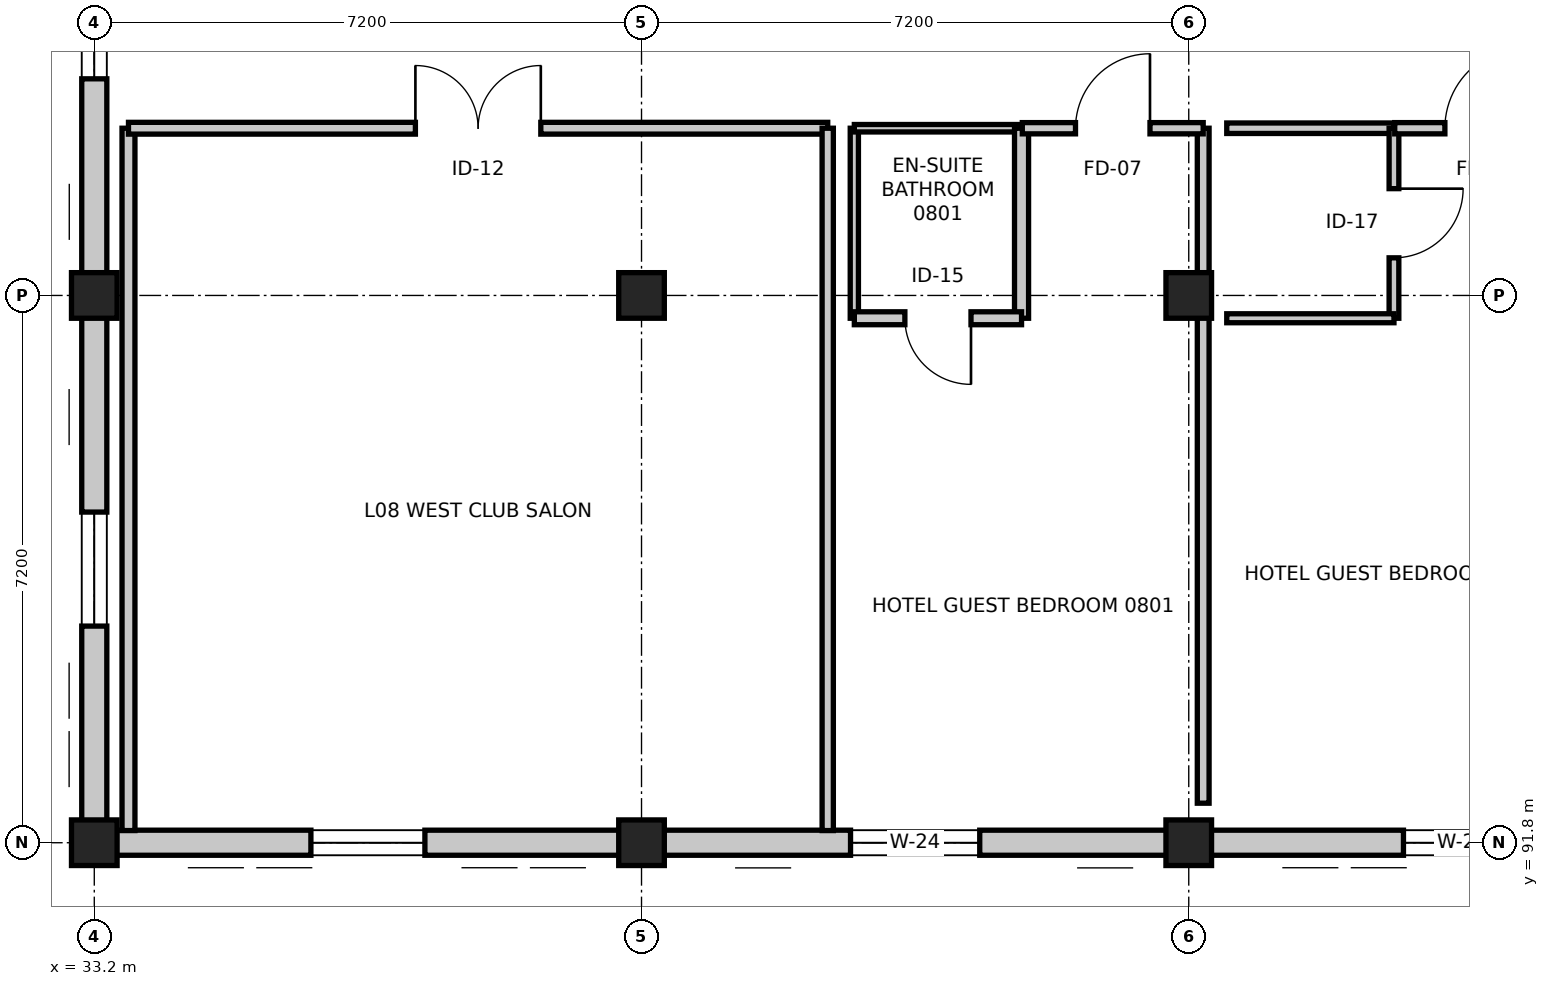
"""IFC4 building model, lengths in metres.
Left out: names, types, materials, properties, quantities, classifications, styles, units other than length and angle.
Written with IfcOpenShell. Run it as: python <this file> out.ifc"""

import sys

from ifc_helpers import new_model, si_unit, direction, frame, frame_2d, origin, origin_2d, place, context, subcontext, project, spatial, rectangle, extrude, element, fill, save


model = new_model("IFC4")
c1 = context("Model", 3, precision=1e-05, world=origin(), true_north=direction((0.0, 1.0)))
c2 = subcontext(c1, "Body", "Model", "MODEL_VIEW")
j1 = project(units=[si_unit("LENGTHUNIT", "METRE"), si_unit("PLANEANGLEUNIT", "RADIAN")], contexts=[c1])
p1 = place(None, origin())
s1 = spatial("IfcSite", under=j1, at=p1, CompositionType="ELEMENT")
p2 = place(p1, origin())
s2 = spatial("IfcBuilding", under=s1, at=p2, CompositionType="ELEMENT")
p3 = place(p2, frame((0.0, 0.0, 33.6)))
s3 = spatial("IfcBuildingStorey", under=s2, at=p3, CompositionType="ELEMENT", Elevation=33.6)
for number, where, z_axis, x_axis in (
    (1, (33.2, 91.8, 0.0), (0.0, 0.0, 1.0), (1.0, 0.0, 0.0)),
    (2, (33.2, 99.0, 0.0), (0.0, 0.0, 1.0), (1.0, 0.0, 0.0)),
    (3, (40.4, 91.8, 0.0), (0.0, 0.0, 1.0), (1.0, 0.0, 0.0)),
    (4, (40.4, 99.0, 0.0), (0.0, 0.0, 1.0), (1.0, 0.0, 0.0)),
    (5, (47.6, 91.8, 0.0), (0.0, 0.0, 1.0), (1.0, 0.0, 0.0)),
    (6, (47.6, 99.0, 0.0), (0.0, 0.0, 1.0), (1.0, 0.0, 0.0)),
):
    element("IfcColumn", number, at=place(p3, frame(where, z_axis=z_axis, x_axis=x_axis)), inside=s3, PredefinedType="COLUMN", context=c2, shape_type="SweptSolid", body=[
        extrude(rectangle(XDim=0.6, YDim=0.6, at=origin_2d()), origin(), (0.0, 0.0, 1.0), 3.6),
    ])
p4 = place(p3, frame((54.8, 91.8, 0.0), z_axis=(0.0, 0.0, 1.0), x_axis=(-1.0, 0.0, 0.0)))
e7 = element("IfcWall", 7, at=p4, inside=s3, PredefinedType="STANDARD", context=c2, shape_type="SweptSolid", body=[
    extrude(rectangle(XDim=7.2, YDim=0.33, at=frame_2d((3.6, 0.0))), origin(), (0.0, 0.0, 1.0), 2.745),
])
p5 = place(p4, frame((2.825, 0.0, 0.75)))
e8 = element("IfcOpeningElement", 8, at=p5, cuts=e7, PredefinedType="OPENING", context=c2, shape_type="SweptSolid", body=[
    extrude(rectangle(XDim=1.55, YDim=1.75, at=frame_2d((0.775, 0.875))), frame((0.0, 0.175, 0.0), z_axis=(0.0, -1.0, 0.0), x_axis=(1.0, 0.0, 0.0)), (0.0, 0.0, 1.0), 0.35),
])
p6 = place(p3, frame((47.6, 91.8, 0.0), z_axis=(0.0, 0.0, 1.0), x_axis=(-1.0, 0.0, 0.0)))
e9 = element("IfcWall", 9, at=p6, inside=s3, PredefinedType="STANDARD", context=c2, shape_type="SweptSolid", body=[
    extrude(rectangle(XDim=7.2, YDim=0.33, at=frame_2d((3.6, 0.0))), origin(), (0.0, 0.0, 1.0), 2.745),
])
p7 = place(p6, frame((2.75, 0.0, 0.75)))
e10 = element("IfcOpeningElement", 10, at=p7, cuts=e9, PredefinedType="OPENING", context=c2, shape_type="SweptSolid", body=[
    extrude(rectangle(XDim=1.7, YDim=1.75, at=frame_2d((0.85, 0.875))), frame((0.0, 0.175, 0.0), z_axis=(0.0, -1.0, 0.0), x_axis=(1.0, 0.0, 0.0)), (0.0, 0.0, 1.0), 0.35),
])
p8 = place(p3, frame((40.4, 91.8, 0.0), z_axis=(0.0, 0.0, 1.0), x_axis=(-1.0, 0.0, 0.0)))
e11 = element("IfcWall", 11, at=p8, inside=s3, PredefinedType="STANDARD", context=c2, shape_type="SweptSolid", body=[
    extrude(rectangle(XDim=7.2, YDim=0.33, at=frame_2d((3.6, 0.0))), origin(), (0.0, 0.0, 1.0), 2.745),
])
p9 = place(p8, frame((2.85, 0.0, 0.75)))
e12 = element("IfcOpeningElement", 12, at=p9, cuts=e11, PredefinedType="OPENING", context=c2, shape_type="SweptSolid", body=[
    extrude(rectangle(XDim=1.5, YDim=1.5, at=frame_2d((0.75, 0.75))), frame((0.0, 0.175, 0.0), z_axis=(0.0, -1.0, 0.0), x_axis=(1.0, 0.0, 0.0)), (0.0, 0.0, 1.0), 0.35),
])
p10 = place(p3, frame((33.2, 91.8, 0.0), z_axis=(0.0, 0.0, 1.0), x_axis=(0.0, 1.0, 0.0)))
e13 = element("IfcWall", 13, at=p10, inside=s3, PredefinedType="STANDARD", context=c2, shape_type="SweptSolid", body=[
    extrude(rectangle(XDim=7.2, YDim=0.33, at=frame_2d((3.6, 0.0))), origin(), (0.0, 0.0, 1.0), 2.695),
])
p11 = place(p10, frame((2.85, 0.0, 0.75)))
e14 = element("IfcOpeningElement", 14, at=p11, cuts=e13, PredefinedType="OPENING", context=c2, shape_type="SweptSolid", body=[
    extrude(rectangle(XDim=1.5, YDim=1.5, at=frame_2d((0.75, 0.75))), frame((0.0, 0.175, 0.0), z_axis=(0.0, -1.0, 0.0), x_axis=(1.0, 0.0, 0.0)), (0.0, 0.0, 1.0), 0.35),
])
p12 = place(p3, frame((33.2, 99.0, 0.0), z_axis=(0.0, 0.0, 1.0), x_axis=(0.0, 1.0, 0.0)))
e15 = element("IfcWall", 15, at=p12, inside=s3, PredefinedType="STANDARD", context=c2, shape_type="SweptSolid", body=[
    extrude(rectangle(XDim=7.2, YDim=0.33, at=frame_2d((3.6, 0.0))), origin(), (0.0, 0.0, 1.0), 2.695),
])
p13 = place(p12, frame((2.85, 0.0, 0.75)))
e16 = element("IfcOpeningElement", 16, at=p13, cuts=e15, PredefinedType="OPENING", context=c2, shape_type="SweptSolid", body=[
    extrude(rectangle(XDim=1.5, YDim=1.5, at=frame_2d((0.75, 0.75))), frame((0.0, 0.175, 0.0), z_axis=(0.0, -1.0, 0.0), x_axis=(1.0, 0.0, 0.0)), (0.0, 0.0, 1.0), 0.35),
])
p14 = place(p3, frame((33.65, 91.96, 0.0), z_axis=(0.0, 0.0, 1.0), x_axis=(0.0, 1.0, 0.0)))
e17 = element("IfcWall", 17, at=p14, inside=s3, PredefinedType="PARTITIONING", context=c2, shape_type="SweptSolid", body=[
    extrude(rectangle(XDim=9.24, YDim=0.17, at=frame_2d((4.62, 0.0))), origin(), (0.0, 0.0, 1.0), 2.745),
])
p15 = place(p3, frame((33.65, 101.2, 0.0), z_axis=(0.0, 0.0, 1.0), x_axis=(1.0, 0.0, 0.0)))
e18 = element("IfcWall", 18, at=p15, inside=s3, PredefinedType="PARTITIONING", context=c2, shape_type="SweptSolid", body=[
    extrude(rectangle(XDim=9.2, YDim=0.155, at=frame_2d((4.6, 0.0))), origin(), (0.0, 0.0, 1.0), 2.695),
])
p16 = place(p15, frame((3.775, 0.0, 0.0)))
e19 = element("IfcOpeningElement", 19, at=p16, cuts=e18, PredefinedType="OPENING", context=c2, shape_type="SweptSolid", body=[
    extrude(rectangle(XDim=1.65, YDim=2.25, at=frame_2d((0.825, 1.125))), frame((0.0, 0.087, 0.0), z_axis=(0.0, -1.0, 0.0), x_axis=(1.0, 0.0, 0.0)), (0.0, 0.0, 1.0), 0.175),
])
p17 = place(p3, frame((42.85, 101.2, 0.0), z_axis=(0.0, 0.0, 1.0), x_axis=(0.0, -1.0, 0.0)))
e20 = element("IfcWall", 20, at=p17, inside=s3, PredefinedType="PARTITIONING", context=c2, shape_type="SweptSolid", body=[
    extrude(rectangle(XDim=9.24, YDim=0.148, at=frame_2d((4.62, 0.0))), origin(), (0.0, 0.0, 1.0), 2.745),
])
p18 = place(p3, frame((43.2, 98.7, 0.0), z_axis=(0.0, 0.0, 1.0), x_axis=(0.0, 1.0, 0.0)))
e21 = element("IfcWall", 21, at=p18, inside=s3, PredefinedType="PARTITIONING", context=c2, shape_type="SweptSolid", body=[
    extrude(rectangle(XDim=2.5, YDim=0.108, at=frame_2d((1.25, 0.0))), origin(), (0.0, 0.0, 1.0), 2.745),
])
p19 = place(p3, frame((43.2, 101.2, 0.0), z_axis=(0.0, 0.0, 1.0), x_axis=(1.0, 0.0, 0.0)))
e22 = element("IfcWall", 22, at=p19, inside=s3, PredefinedType="PARTITIONING", context=c2, shape_type="SweptSolid", body=[
    extrude(rectangle(XDim=2.2, YDim=0.098, at=frame_2d((1.1, 0.0))), origin(), (0.0, 0.0, 1.0), 3.36),
])
p20 = place(p3, frame((45.4, 101.2, 0.0), z_axis=(0.0, 0.0, 1.0), x_axis=(0.0, -1.0, 0.0)))
e23 = element("IfcWall", 23, at=p20, inside=s3, PredefinedType="PARTITIONING", context=c2, shape_type="SweptSolid", body=[
    extrude(rectangle(XDim=2.5, YDim=0.185, at=frame_2d((1.25, 0.0))), origin(), (0.0, 0.0, 1.0), 2.745),
])
p21 = place(p3, frame((45.4, 98.7, 0.0), z_axis=(0.0, 0.0, 1.0), x_axis=(-1.0, 0.0, 0.0)))
e24 = element("IfcWall", 24, at=p21, inside=s3, PredefinedType="PARTITIONING", context=c2, shape_type="SweptSolid", body=[
    extrude(rectangle(XDim=2.2, YDim=0.17, at=frame_2d((1.1, 0.0))), origin(), (0.0, 0.0, 1.0), 2.745),
])
p22 = place(p21, frame((0.665, 0.0, 0.0)))
e25 = element("IfcOpeningElement", 25, at=p22, cuts=e24, PredefinedType="OPENING", context=c2, shape_type="SweptSolid", body=[
    extrude(rectangle(XDim=0.87, YDim=2.07, at=frame_2d((0.435, 1.035))), frame((0.0, 0.095, 0.0), z_axis=(0.0, -1.0, 0.0), x_axis=(1.0, 0.0, 0.0)), (0.0, 0.0, 1.0), 0.19),
])
p23 = place(p3, frame((47.79, 101.2, 0.0), z_axis=(0.0, 0.0, 1.0), x_axis=(0.0, -1.0, 0.0)))
e26 = element("IfcWall", 26, at=p23, inside=s3, PredefinedType="PARTITIONING", context=c2, shape_type="SweptSolid", body=[
    extrude(rectangle(XDim=8.88, YDim=0.155, at=frame_2d((4.44, 0.0))), origin(), (0.0, 0.0, 1.0), 2.695),
])
p24 = place(p3, frame((45.41, 101.2, 0.0), z_axis=(0.0, 0.0, 1.0), x_axis=(1.0, 0.0, 0.0)))
e27 = element("IfcWall", 27, at=p24, inside=s3, PredefinedType="PARTITIONING", context=c2, shape_type="SweptSolid", body=[
    extrude(rectangle(XDim=2.38, YDim=0.148, at=frame_2d((1.19, 0.0))), origin(), (0.0, 0.0, 1.0), 2.695),
])
p25 = place(p24, frame((0.7, 0.0, 0.0)))
e28 = element("IfcOpeningElement", 28, at=p25, cuts=e27, PredefinedType="OPENING", context=c2, shape_type="SweptSolid", body=[
    extrude(rectangle(XDim=0.98, YDim=2.15, at=frame_2d((0.49, 1.075))), frame((0.0, 0.084, 0.0), z_axis=(0.0, -1.0, 0.0), x_axis=(1.0, 0.0, 0.0)), (0.0, 0.0, 1.0), 0.168),
])
p26 = place(p3, frame((48.1, 101.2, 0.0), z_axis=(0.0, 0.0, 1.0), x_axis=(1.0, 0.0, 0.0)))
e29 = element("IfcWall", 29, at=p26, inside=s3, PredefinedType="PARTITIONING", context=c2, shape_type="SweptSolid", body=[
    extrude(rectangle(XDim=2.2, YDim=0.138, at=frame_2d((1.1, 0.0))), origin(), (0.0, 0.0, 1.0), 3.36),
])
p27 = place(p3, frame((50.3, 101.2, 0.0), z_axis=(0.0, 0.0, 1.0), x_axis=(0.0, -1.0, 0.0)))
e30 = element("IfcWall", 30, at=p27, inside=s3, PredefinedType="PARTITIONING", context=c2, shape_type="SweptSolid", body=[
    extrude(rectangle(XDim=2.5, YDim=0.128, at=frame_2d((1.25, 0.0))), origin(), (0.0, 0.0, 1.0), 2.745),
])
p28 = place(p27, frame((0.795, 0.0, 0.0)))
e31 = element("IfcOpeningElement", 31, at=p28, cuts=e30, PredefinedType="OPENING", context=c2, shape_type="SweptSolid", body=[
    extrude(rectangle(XDim=0.91, YDim=2.11, at=frame_2d((0.455, 1.055))), frame((0.0, 0.074, 0.0), z_axis=(0.0, -1.0, 0.0), x_axis=(1.0, 0.0, 0.0)), (0.0, 0.0, 1.0), 0.148),
])
p29 = place(p3, frame((50.3, 98.7, 0.0), z_axis=(0.0, 0.0, 1.0), x_axis=(-1.0, 0.0, 0.0)))
e32 = element("IfcWall", 32, at=p29, inside=s3, PredefinedType="PARTITIONING", context=c2, shape_type="SweptSolid", body=[
    extrude(rectangle(XDim=2.2, YDim=0.118, at=frame_2d((1.1, 0.0))), origin(), (0.0, 0.0, 1.0), 3.36),
])
p30 = place(p3, frame((50.31, 101.2, 0.0), z_axis=(0.0, 0.0, 1.0), x_axis=(1.0, 0.0, 0.0)))
e33 = element("IfcWall", 33, at=p30, inside=s3, PredefinedType="PARTITIONING", context=c2, shape_type="SweptSolid", body=[
    extrude(rectangle(XDim=2.38, YDim=0.148, at=frame_2d((1.19, 0.0))), origin(), (0.0, 0.0, 1.0), 3.36),
])
p31 = place(p30, frame((0.66, 0.0, 0.0)))
e34 = element("IfcOpeningElement", 34, at=p31, cuts=e33, PredefinedType="OPENING", context=c2, shape_type="SweptSolid", body=[
    extrude(rectangle(XDim=1.06, YDim=2.2, at=frame_2d((0.53, 1.1))), frame((0.0, 0.084, 0.0), z_axis=(0.0, -1.0, 0.0), x_axis=(1.0, 0.0, 0.0)), (0.0, 0.0, 1.0), 0.168),
])
p32 = place(p5, origin())
e35 = element("IfcWindow", 35, at=p32, inside=s3, PartitioningType="SINGLE_PANEL", PredefinedType="WINDOW", context=c2, shape_type="SweptSolid", body=[
    extrude(rectangle(XDim=1.55, YDim=1.75, at=frame_2d((0.775, 0.875))), frame((0.0, 0.03, 0.0), z_axis=(0.0, -1.0, 0.0), x_axis=(1.0, 0.0, 0.0)), (0.0, 0.0, 1.0), 0.06),
])
fill(e8, e35)
p33 = place(p7, origin())
e36 = element("IfcWindow", 36, at=p33, inside=s3, PartitioningType="SINGLE_PANEL", PredefinedType="WINDOW", context=c2, shape_type="SweptSolid", body=[
    extrude(rectangle(XDim=1.7, YDim=1.75, at=frame_2d((0.85, 0.875))), frame((0.0, 0.03, 0.0), z_axis=(0.0, -1.0, 0.0), x_axis=(1.0, 0.0, 0.0)), (0.0, 0.0, 1.0), 0.06),
])
fill(e10, e36)
p34 = place(p9, origin())
e37 = element("IfcWindow", 37, at=p34, inside=s3, PartitioningType="SINGLE_PANEL", PredefinedType="WINDOW", context=c2, shape_type="SweptSolid", body=[
    extrude(rectangle(XDim=1.5, YDim=1.5, at=frame_2d((0.75, 0.75))), frame((0.0, 0.03, 0.0), z_axis=(0.0, -1.0, 0.0), x_axis=(1.0, 0.0, 0.0)), (0.0, 0.0, 1.0), 0.06),
])
fill(e12, e37)
p35 = place(p11, origin())
e38 = element("IfcWindow", 38, at=p35, inside=s3, PartitioningType="SINGLE_PANEL", PredefinedType="WINDOW", context=c2, shape_type="SweptSolid", body=[
    extrude(rectangle(XDim=1.5, YDim=1.5, at=frame_2d((0.75, 0.75))), frame((0.0, 0.03, 0.0), z_axis=(0.0, -1.0, 0.0), x_axis=(1.0, 0.0, 0.0)), (0.0, 0.0, 1.0), 0.06),
])
fill(e14, e38)
p36 = place(p13, origin())
e39 = element("IfcWindow", 39, at=p36, inside=s3, PartitioningType="SINGLE_PANEL", PredefinedType="WINDOW", context=c2, shape_type="SweptSolid", body=[
    extrude(rectangle(XDim=1.5, YDim=1.5, at=frame_2d((0.75, 0.75))), frame((0.0, 0.03, 0.0), z_axis=(0.0, -1.0, 0.0), x_axis=(1.0, 0.0, 0.0)), (0.0, 0.0, 1.0), 0.06),
])
fill(e16, e39)
p37 = place(p16, origin())
e40 = element("IfcDoor", 40, at=p37, inside=s3, OperationType="DOUBLE_DOOR_SINGLE_SWING", PredefinedType="DOOR", context=c2, shape_type="SweptSolid", body=[
    extrude(rectangle(XDim=1.65, YDim=2.25, at=frame_2d((0.825, 1.125))), frame((0.0, 0.025, 0.0), z_axis=(0.0, -1.0, 0.0), x_axis=(1.0, 0.0, 0.0)), (0.0, 0.0, 1.0), 0.05),
])
fill(e19, e40)
p38 = place(p22, origin())
e41 = element("IfcDoor", 41, at=p38, inside=s3, OperationType="SINGLE_SWING_LEFT", PredefinedType="DOOR", context=c2, shape_type="SweptSolid", body=[
    extrude(rectangle(XDim=0.87, YDim=2.07, at=frame_2d((0.435, 1.035))), frame((0.0, 0.025, 0.0), z_axis=(0.0, -1.0, 0.0), x_axis=(1.0, 0.0, 0.0)), (0.0, 0.0, 1.0), 0.05),
])
fill(e25, e41)
p39 = place(p25, origin())
e42 = element("IfcDoor", 42, at=p39, inside=s3, OperationType="SINGLE_SWING_RIGHT", PredefinedType="DOOR", context=c2, shape_type="SweptSolid", body=[
    extrude(rectangle(XDim=0.98, YDim=2.15, at=frame_2d((0.49, 1.075))), frame((0.0, 0.025, 0.0), z_axis=(0.0, -1.0, 0.0), x_axis=(1.0, 0.0, 0.0)), (0.0, 0.0, 1.0), 0.05),
])
fill(e28, e42)
p40 = place(p28, origin())
e43 = element("IfcDoor", 43, at=p40, inside=s3, OperationType="SINGLE_SWING_LEFT", PredefinedType="DOOR", context=c2, shape_type="SweptSolid", body=[
    extrude(rectangle(XDim=0.91, YDim=2.11, at=frame_2d((0.455, 1.055))), frame((0.0, 0.025, 0.0), z_axis=(0.0, -1.0, 0.0), x_axis=(1.0, 0.0, 0.0)), (0.0, 0.0, 1.0), 0.05),
])
fill(e31, e43)
p41 = place(p31, origin())
e44 = element("IfcDoor", 44, at=p41, inside=s3, OperationType="SINGLE_SWING_RIGHT", PredefinedType="DOOR", context=c2, shape_type="SweptSolid", body=[
    extrude(rectangle(XDim=1.06, YDim=2.2, at=frame_2d((0.53, 1.1))), frame((0.0, 0.025, 0.0), z_axis=(0.0, -1.0, 0.0), x_axis=(1.0, 0.0, 0.0)), (0.0, 0.0, 1.0), 0.05),
])
fill(e34, e44)
save(model, sys.argv[1])
